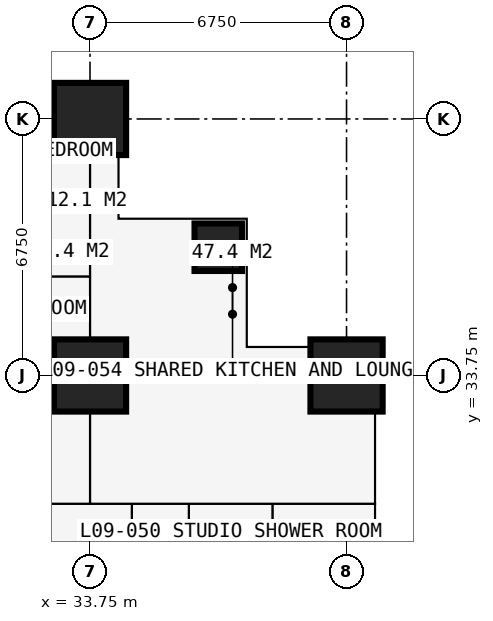
"""IFC4 building model, lengths in metres.
Left out: names, types, materials, properties, quantities, classifications, styles, units other than length and angle.
Written with IfcOpenShell. Run it as: python <this file> out.ifc"""

import sys

from ifc_helpers import new_model, si_unit, direction, frame, frame_2d, origin, origin_2d, place, context, subcontext, project, spatial, rectangle, extrude, element, fill, save


model = new_model("IFC4")
c1 = context("Model", 3, precision=1e-05, world=origin(), true_north=direction((0.0, 1.0)))
c2 = subcontext(c1, "Body", "Model", "MODEL_VIEW")
j1 = project(units=[si_unit("LENGTHUNIT", "METRE"), si_unit("PLANEANGLEUNIT", "RADIAN")], contexts=[c1])
p1 = place(None, origin())
s1 = spatial("IfcSite", under=j1, at=p1, CompositionType="ELEMENT")
p2 = place(p1, origin())
s2 = spatial("IfcBuilding", under=s1, at=p2, CompositionType="ELEMENT")
p3 = place(p2, frame((0.0, 0.0, 36.0)))
s3 = spatial("IfcBuildingStorey", under=s2, at=p3, CompositionType="ELEMENT", Elevation=36.0)
for number, where, z_axis, x_axis in (
    (1, (33.75, 33.75, 0.0), (0.0, 0.0, 1.0), (1.0, 0.0, 0.0)),
    (2, (33.75, 40.5, 0.0), (0.0, 0.0, 1.0), (1.0, 0.0, 0.0)),
):
    element("IfcColumn", number, at=place(p3, frame(where, z_axis=z_axis, x_axis=x_axis)), inside=s3, PredefinedType="COLUMN", context=c2, shape_type="SweptSolid", body=[
        extrude(rectangle(XDim=1.9, YDim=1.9, at=origin_2d()), origin(), (0.0, 0.0, 1.0), 3.6),
    ])
p4 = place(p3, frame((37.125, 37.125, 0.0), z_axis=(0.0, 0.0, 1.0), x_axis=(1.0, 0.0, 0.0)))
e3 = element("IfcColumn", 3, at=p4, inside=s3, PredefinedType="COLUMN", context=c2, shape_type="SweptSolid", body=[
    extrude(rectangle(XDim=1.25, YDim=1.25, at=origin_2d()), origin(), (0.0, 0.0, 1.0), 3.6),
])
p5 = place(p3, frame((40.5, 33.75, 0.0), z_axis=(0.0, 0.0, 1.0), x_axis=(1.0, 0.0, 0.0)))
e4 = element("IfcColumn", 4, at=p5, inside=s3, PredefinedType="COLUMN", context=c2, shape_type="SweptSolid", body=[
    extrude(rectangle(XDim=1.9, YDim=1.9, at=origin_2d()), origin(), (0.0, 0.0, 1.0), 3.6),
])
p6 = place(p3, frame((41.25, 34.5, 0.0), z_axis=(0.0, 0.0, 1.0), x_axis=(-1.0, 0.0, 0.0)))
e5 = element("IfcWall", 5, at=p6, inside=s3, PredefinedType="SOLIDWALL", context=c2, shape_type="SweptSolid", body=[
    extrude(rectangle(XDim=3.375, YDim=0.3, at=frame_2d((1.688, 0.0))), origin(), (0.0, 0.0, 1.0), 3.375),
])
p7 = place(p6, frame((1.857, 0.0, 0.9)))
e6 = element("IfcOpeningElement", 6, at=p7, cuts=e5, PredefinedType="OPENING", context=c2, shape_type="SweptSolid", body=[
    extrude(rectangle(XDim=1.2, YDim=1.8, at=frame_2d((0.6, 0.9))), frame((0.0, 0.16, 0.0), z_axis=(0.0, -1.0, 0.0), x_axis=(1.0, 0.0, 0.0)), (0.0, 0.0, 1.0), 0.32),
])
p8 = place(p3, frame((37.875, 34.5, 0.0), z_axis=(0.0, 0.0, 1.0), x_axis=(0.0, 1.0, 0.0)))
e7 = element("IfcWall", 7, at=p8, inside=s3, PredefinedType="SOLIDWALL", context=c2, shape_type="SweptSolid", body=[
    extrude(rectangle(XDim=3.375, YDim=0.3, at=frame_2d((1.688, 0.0))), origin(), (0.0, 0.0, 1.0), 3.375),
])
p9 = place(p8, frame((0.788, 0.0, 0.6)))
e8 = element("IfcOpeningElement", 8, at=p9, cuts=e7, PredefinedType="OPENING", context=c2, shape_type="SweptSolid", body=[
    extrude(rectangle(XDim=1.8, YDim=2.1, at=frame_2d((0.9, 1.05))), frame((0.0, 0.16, 0.0), z_axis=(0.0, -1.0, 0.0), x_axis=(1.0, 0.0, 0.0)), (0.0, 0.0, 1.0), 0.32),
])
p10 = place(p3, frame((37.875, 37.875, 0.0), z_axis=(0.0, 0.0, 1.0), x_axis=(-1.0, 0.0, 0.0)))
e9 = element("IfcWall", 9, at=p10, inside=s3, PredefinedType="SOLIDWALL", context=c2, shape_type="SweptSolid", body=[
    extrude(rectangle(XDim=3.375, YDim=0.3, at=frame_2d((1.688, 0.0))), origin(), (0.0, 0.0, 1.0), 3.375),
])
p11 = place(p10, frame((0.788, 0.0, 0.6)))
e10 = element("IfcOpeningElement", 10, at=p11, cuts=e9, PredefinedType="OPENING", context=c2, shape_type="SweptSolid", body=[
    extrude(rectangle(XDim=1.8, YDim=2.1, at=frame_2d((0.9, 1.05))), frame((0.0, 0.16, 0.0), z_axis=(0.0, -1.0, 0.0), x_axis=(1.0, 0.0, 0.0)), (0.0, 0.0, 1.0), 0.32),
])
p12 = place(p3, frame((34.5, 37.875, 0.0), z_axis=(0.0, 0.0, 1.0), x_axis=(0.0, 1.0, 0.0)))
e11 = element("IfcWall", 11, at=p12, inside=s3, PredefinedType="SOLIDWALL", context=c2, shape_type="SweptSolid", body=[
    extrude(rectangle(XDim=3.375, YDim=0.3, at=frame_2d((1.688, 0.0))), origin(), (0.0, 0.0, 1.0), 3.375),
])
p13 = place(p12, frame((0.317, 0.0, 0.9)))
e12 = element("IfcOpeningElement", 12, at=p13, cuts=e11, PredefinedType="OPENING", context=c2, shape_type="SweptSolid", body=[
    extrude(rectangle(XDim=1.2, YDim=1.8, at=frame_2d((0.6, 0.9))), frame((0.0, 0.16, 0.0), z_axis=(0.0, -1.0, 0.0), x_axis=(1.0, 0.0, 0.0)), (0.0, 0.0, 1.0), 0.32),
])
p14 = place(p3, frame((10.125, 36.35, 0.0), z_axis=(0.0, 0.0, 1.0), x_axis=(1.0, 0.0, 0.0)))
e13 = element("IfcWall", 13, at=p14, inside=s3, PredefinedType="PARTITIONING", context=c2, shape_type="SweptSolid", body=[
    extrude(rectangle(XDim=23.625, YDim=0.15, at=frame_2d((11.812, 0.0))), origin(), (0.0, 0.0, 1.0), 3.375),
])
p15 = place(p14, frame((20.5, 0.0, 0.0)))
e14 = element("IfcOpeningElement", 14, at=p15, cuts=e13, PredefinedType="OPENING", context=c2, shape_type="SweptSolid", body=[
    extrude(rectangle(XDim=0.95, YDim=2.2, at=frame_2d((0.475, 1.1))), frame((0.0, 0.085, 0.0), z_axis=(0.0, -1.0, 0.0), x_axis=(1.0, 0.0, 0.0)), (0.0, 0.0, 1.0), 0.17),
])
p16 = place(p14, frame((17.125, 0.0, 0.0)))
e15 = element("IfcOpeningElement", 15, at=p16, cuts=e13, PredefinedType="OPENING", context=c2, shape_type="SweptSolid", body=[
    extrude(rectangle(XDim=0.95, YDim=2.2, at=frame_2d((0.475, 1.1))), frame((0.0, 0.085, 0.0), z_axis=(0.0, -1.0, 0.0), x_axis=(1.0, 0.0, 0.0)), (0.0, 0.0, 1.0), 0.17),
])
p17 = place(p14, frame((13.7, 0.0, 0.0)))
e16 = element("IfcOpeningElement", 16, at=p17, cuts=e13, PredefinedType="OPENING", context=c2, shape_type="SweptSolid", body=[
    extrude(rectangle(XDim=0.95, YDim=2.2, at=frame_2d((0.475, 1.1))), frame((0.0, 0.085, 0.0), z_axis=(0.0, -1.0, 0.0), x_axis=(1.0, 0.0, 0.0)), (0.0, 0.0, 1.0), 0.17),
])
p18 = place(p14, frame((4.2, 0.0, 0.0)))
e17 = element("IfcOpeningElement", 17, at=p18, cuts=e13, PredefinedType="OPENING", context=c2, shape_type="SweptSolid", body=[
    extrude(rectangle(XDim=0.95, YDim=2.2, at=frame_2d((0.475, 1.1))), frame((0.0, 0.085, 0.0), z_axis=(0.0, -1.0, 0.0), x_axis=(1.0, 0.0, 0.0)), (0.0, 0.0, 1.0), 0.17),
])
p19 = place(p14, frame((10.95, 0.0, 0.0)))
e18 = element("IfcOpeningElement", 18, at=p19, cuts=e13, PredefinedType="OPENING", context=c2, shape_type="SweptSolid", body=[
    extrude(rectangle(XDim=0.95, YDim=2.2, at=frame_2d((0.475, 1.1))), frame((0.0, 0.085, 0.0), z_axis=(0.0, -1.0, 0.0), x_axis=(1.0, 0.0, 0.0)), (0.0, 0.0, 1.0), 0.17),
])
p20 = place(p3, frame((30.375, 30.375, 0.0), z_axis=(0.0, 0.0, 1.0), x_axis=(1.0, 0.0, 0.0)))
e19 = element("IfcWall", 19, at=p20, inside=s3, PredefinedType="PARTITIONING", context=c2, shape_type="SweptSolid", body=[
    extrude(rectangle(XDim=10.859, YDim=0.15, at=frame_2d((5.429, 0.0))), origin(), (0.0, 0.0, 1.0), 3.375),
])
p21 = place(p3, frame((31.75, 38.55, 0.0), z_axis=(0.0, 0.0, 1.0), x_axis=(1.0, 0.0, 0.0)))
e20 = element("IfcWall", 20, at=p21, inside=s3, PredefinedType="PARTITIONING", context=c2, shape_type="SweptSolid", body=[
    extrude(rectangle(XDim=2.0, YDim=0.1, at=frame_2d((1.0, 0.0))), origin(), (0.0, 0.0, 1.0), 3.375),
])
p22 = place(p3, frame((33.75, 30.375, 0.0), z_axis=(0.0, 0.0, 1.0), x_axis=(0.0, 1.0, 0.0)))
e21 = element("IfcWall", 21, at=p22, inside=s3, PredefinedType="PARTITIONING", context=c2, shape_type="SweptSolid", body=[
    extrude(rectangle(XDim=10.859, YDim=0.15, at=frame_2d((5.429, 0.0))), origin(), (0.0, 0.0, 1.0), 2.877),
])
p23 = place(p22, frame((1.4, 0.0, 0.0)))
e22 = element("IfcOpeningElement", 22, at=p23, cuts=e21, PredefinedType="OPENING", context=c2, shape_type="SweptSolid", body=[
    extrude(rectangle(XDim=1.0, YDim=2.2, at=frame_2d((0.5, 1.1))), frame((0.0, 0.085, 0.0), z_axis=(0.0, -1.0, 0.0), x_axis=(1.0, 0.0, 0.0)), (0.0, 0.0, 1.0), 0.17),
])
p24 = place(p3, frame((34.85, 12.55, 0.0), z_axis=(0.0, 0.0, 1.0), x_axis=(0.0, 1.0, 0.0)))
e23 = element("IfcWall", 23, at=p24, inside=s3, PredefinedType="PARTITIONING", context=c2, shape_type="SweptSolid", body=[
    extrude(rectangle(XDim=17.825, YDim=0.15, at=frame_2d((8.913, 0.0))), origin(), (0.0, 0.0, 1.0), 3.375),
])
p25 = place(p24, frame((8.65, 0.0, 0.0)))
e24 = element("IfcOpeningElement", 24, at=p25, cuts=e23, PredefinedType="OPENING", context=c2, shape_type="SweptSolid", body=[
    extrude(rectangle(XDim=0.95, YDim=2.2, at=frame_2d((0.475, 1.1))), frame((0.0, 0.085, 0.0), z_axis=(0.0, -1.0, 0.0), x_axis=(1.0, 0.0, 0.0)), (0.0, 0.0, 1.0), 0.17),
])
p26 = place(p3, frame((36.35, 6.75, 0.0), z_axis=(0.0, 0.0, 1.0), x_axis=(0.0, 1.0, 0.0)))
e25 = element("IfcWall", 25, at=p26, inside=s3, PredefinedType="PARTITIONING", context=c2, shape_type="SweptSolid", body=[
    extrude(rectangle(XDim=23.625, YDim=0.1, at=frame_2d((11.812, 0.0))), origin(), (0.0, 0.0, 1.0), 3.375),
])
p27 = place(p26, frame((3.575, 0.0, 0.0)))
e26 = element("IfcOpeningElement", 26, at=p27, cuts=e25, PredefinedType="OPENING", context=c2, shape_type="SweptSolid", body=[
    extrude(rectangle(XDim=0.95, YDim=2.2, at=frame_2d((0.475, 1.1))), frame((0.0, 0.06, 0.0), z_axis=(0.0, -1.0, 0.0), x_axis=(1.0, 0.0, 0.0)), (0.0, 0.0, 1.0), 0.12),
])
p28 = place(p26, frame((7.0, 0.0, 0.0)))
e27 = element("IfcOpeningElement", 27, at=p28, cuts=e25, PredefinedType="OPENING", context=c2, shape_type="SweptSolid", body=[
    extrude(rectangle(XDim=0.95, YDim=2.2, at=frame_2d((0.475, 1.1))), frame((0.0, 0.06, 0.0), z_axis=(0.0, -1.0, 0.0), x_axis=(1.0, 0.0, 0.0)), (0.0, 0.0, 1.0), 0.12),
])
p29 = place(p26, frame((10.375, 0.0, 0.0)))
e28 = element("IfcOpeningElement", 28, at=p29, cuts=e25, PredefinedType="OPENING", context=c2, shape_type="SweptSolid", body=[
    extrude(rectangle(XDim=0.95, YDim=2.2, at=frame_2d((0.475, 1.1))), frame((0.0, 0.06, 0.0), z_axis=(0.0, -1.0, 0.0), x_axis=(1.0, 0.0, 0.0)), (0.0, 0.0, 1.0), 0.12),
])
p30 = place(p26, frame((13.75, 0.0, 0.0)))
e29 = element("IfcOpeningElement", 29, at=p30, cuts=e25, PredefinedType="OPENING", context=c2, shape_type="SweptSolid", body=[
    extrude(rectangle(XDim=0.95, YDim=2.2, at=frame_2d((0.475, 1.1))), frame((0.0, 0.06, 0.0), z_axis=(0.0, -1.0, 0.0), x_axis=(1.0, 0.0, 0.0)), (0.0, 0.0, 1.0), 0.12),
])
p31 = place(p26, frame((17.125, 0.0, 0.0)))
e30 = element("IfcOpeningElement", 30, at=p31, cuts=e25, PredefinedType="OPENING", context=c2, shape_type="SweptSolid", body=[
    extrude(rectangle(XDim=0.95, YDim=2.2, at=frame_2d((0.475, 1.1))), frame((0.0, 0.06, 0.0), z_axis=(0.0, -1.0, 0.0), x_axis=(1.0, 0.0, 0.0)), (0.0, 0.0, 1.0), 0.12),
])
p32 = place(p26, frame((20.5, 0.0, 0.0)))
e31 = element("IfcOpeningElement", 31, at=p32, cuts=e25, PredefinedType="OPENING", context=c2, shape_type="SweptSolid", body=[
    extrude(rectangle(XDim=0.95, YDim=2.2, at=frame_2d((0.475, 1.1))), frame((0.0, 0.06, 0.0), z_axis=(0.0, -1.0, 0.0), x_axis=(1.0, 0.0, 0.0)), (0.0, 0.0, 1.0), 0.12),
])
p33 = place(p3, frame((38.55, 28.375, 0.0), z_axis=(0.0, 0.0, 1.0), x_axis=(0.0, 1.0, 0.0)))
e32 = element("IfcWall", 32, at=p33, inside=s3, PredefinedType="PARTITIONING", context=c2, shape_type="SweptSolid", body=[
    extrude(rectangle(XDim=2.0, YDim=0.1, at=frame_2d((1.0, 0.0))), origin(), (0.0, 0.0, 1.0), 3.375),
])
p34 = place(p7, origin())
e33 = element("IfcWindow", 33, at=p34, inside=s3, PartitioningType="SINGLE_PANEL", PredefinedType="WINDOW", context=c2, shape_type="SweptSolid", body=[
    extrude(rectangle(XDim=1.2, YDim=1.8, at=frame_2d((0.6, 0.9))), frame((0.0, 0.03, 0.0), z_axis=(0.0, -1.0, 0.0), x_axis=(1.0, 0.0, 0.0)), (0.0, 0.0, 1.0), 0.06),
])
fill(e6, e33)
p35 = place(p9, origin())
e34 = element("IfcWindow", 34, at=p35, inside=s3, PartitioningType="SINGLE_PANEL", PredefinedType="WINDOW", context=c2, shape_type="SweptSolid", body=[
    extrude(rectangle(XDim=1.8, YDim=2.1, at=frame_2d((0.9, 1.05))), frame((0.0, 0.03, 0.0), z_axis=(0.0, -1.0, 0.0), x_axis=(1.0, 0.0, 0.0)), (0.0, 0.0, 1.0), 0.06),
])
fill(e8, e34)
p36 = place(p11, origin())
e35 = element("IfcWindow", 35, at=p36, inside=s3, PartitioningType="SINGLE_PANEL", PredefinedType="WINDOW", context=c2, shape_type="SweptSolid", body=[
    extrude(rectangle(XDim=1.8, YDim=2.1, at=frame_2d((0.9, 1.05))), frame((0.0, 0.03, 0.0), z_axis=(0.0, -1.0, 0.0), x_axis=(1.0, 0.0, 0.0)), (0.0, 0.0, 1.0), 0.06),
])
fill(e10, e35)
p37 = place(p13, origin())
e36 = element("IfcWindow", 36, at=p37, inside=s3, PartitioningType="SINGLE_PANEL", PredefinedType="WINDOW", context=c2, shape_type="SweptSolid", body=[
    extrude(rectangle(XDim=1.2, YDim=1.8, at=frame_2d((0.6, 0.9))), frame((0.0, 0.03, 0.0), z_axis=(0.0, -1.0, 0.0), x_axis=(1.0, 0.0, 0.0)), (0.0, 0.0, 1.0), 0.06),
])
fill(e12, e36)
p38 = place(p23, origin())
e37 = element("IfcDoor", 37, at=p38, inside=s3, OperationType="SINGLE_SWING_LEFT", PredefinedType="DOOR", context=c2, shape_type="SweptSolid", body=[
    extrude(rectangle(XDim=1.0, YDim=2.2, at=frame_2d((0.5, 1.1))), frame((0.0, 0.025, 0.0), z_axis=(0.0, -1.0, 0.0), x_axis=(1.0, 0.0, 0.0)), (0.0, 0.0, 1.0), 0.05),
])
fill(e22, e37)
save(model, sys.argv[1])
